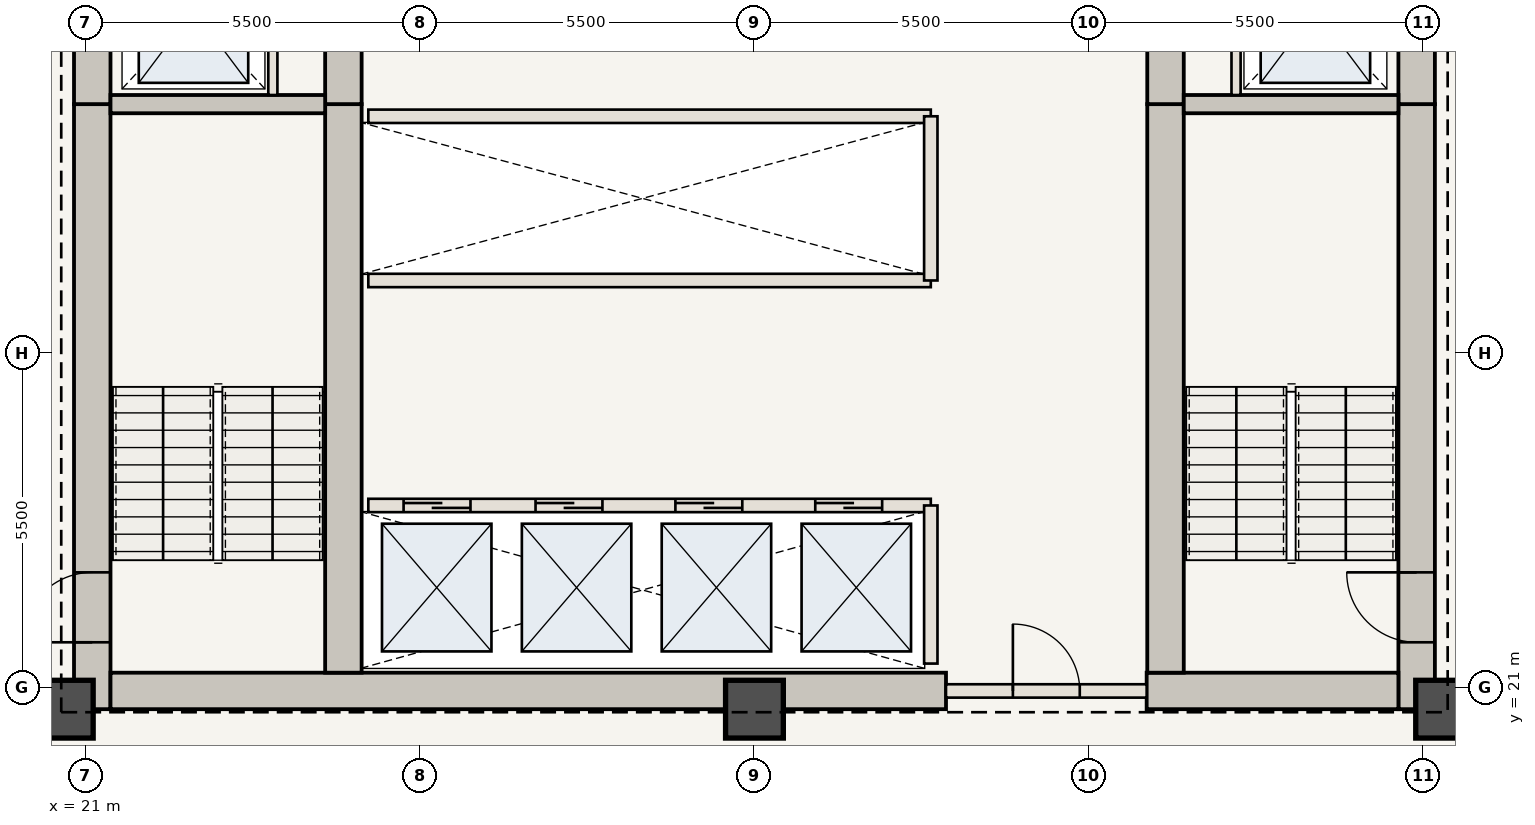
"""IFC4 building model, lengths in metres.
Left out: names, types, materials, properties, quantities, classifications, styles, units other than length and angle.
Written with IfcOpenShell. Run it as: python <this file> out.ifc"""

import sys

from ifc_helpers import new_model, si_unit, direction, frame, frame_2d, origin, origin_2d, place, context, subcontext, project, spatial, rectangle, extrude, element, fill, save


model = new_model("IFC4")
c1 = context("Model", 3, precision=1e-05, world=origin(), true_north=direction((0.0, 1.0)))
c2 = subcontext(c1, "Body", "Model", "MODEL_VIEW")
j1 = project(units=[si_unit("LENGTHUNIT", "METRE"), si_unit("PLANEANGLEUNIT", "RADIAN")], contexts=[c1])
p1 = place(None, origin())
s1 = spatial("IfcSite", under=j1, at=p1, CompositionType="ELEMENT")
p2 = place(p1, origin())
s2 = spatial("IfcBuilding", under=s1, at=p2, CompositionType="ELEMENT")
p3 = place(p2, frame((0.0, 0.0, 149.1)))
s3 = spatial("IfcBuildingStorey", under=s2, at=p3, CompositionType="ELEMENT", Elevation=149.1)
p4 = place(p3, frame((21.11, 20.65, 0.0), z_axis=(0.0, 0.0, 1.0), x_axis=(0.0, 1.0, 0.0)))
e1 = element("IfcWall", 1, at=p4, inside=s3, PredefinedType="SHEAR", context=c2, shape_type="SweptSolid", body=[
    extrude(rectangle(XDim=9.95, YDim=0.6, at=frame_2d((4.975, 0.0))), origin(), (0.0, 0.0, 1.0), 3.85),
])
p5 = place(p4, frame((1.1, 0.0, 0.0)))
e2 = element("IfcOpeningElement", 2, at=p5, cuts=e1, PredefinedType="OPENING", context=c2, shape_type="SweptSolid", body=[
    extrude(rectangle(XDim=1.15, YDim=2.15, at=frame_2d((0.575, 1.075))), frame((0.0, 0.31, 0.0), z_axis=(0.0, -1.0, 0.0), x_axis=(1.0, 0.0, 0.0)), (0.0, 0.0, 1.0), 0.62),
])
p6 = place(p3, frame((21.11, 30.6, 0.0), z_axis=(0.0, 0.0, 1.0), x_axis=(0.0, 1.0, 0.0)))
e3 = element("IfcWall", 3, at=p6, inside=s3, PredefinedType="SHEAR", context=c2, shape_type="SweptSolid", body=[
    extrude(rectangle(XDim=12.7, YDim=0.6, at=frame_2d((6.35, 0.0))), origin(), (0.0, 0.0, 1.0), 3.85),
])
p7 = place(p6, frame((4.2, 0.0, 0.0)))
e4 = element("IfcOpeningElement", 4, at=p7, cuts=e3, PredefinedType="OPENING", context=c2, shape_type="SweptSolid", body=[
    extrude(rectangle(XDim=1.1, YDim=2.15, at=frame_2d((0.55, 1.075))), frame((0.0, 0.31, 0.0), z_axis=(0.0, -1.0, 0.0), x_axis=(1.0, 0.0, 0.0)), (0.0, 0.0, 1.0), 0.62),
])
p8 = place(p6, frame((9.2, 0.0, 0.0)))
e5 = element("IfcOpeningElement", 5, at=p8, cuts=e3, PredefinedType="OPENING", context=c2, shape_type="SweptSolid", body=[
    extrude(rectangle(XDim=0.92, YDim=2.1, at=frame_2d((0.46, 1.05))), frame((0.0, 0.31, 0.0), z_axis=(0.0, -1.0, 0.0), x_axis=(1.0, 0.0, 0.0)), (0.0, 0.0, 1.0), 0.62),
])
p9 = place(p3, frame((42.89, 20.65, 0.0), z_axis=(0.0, 0.0, 1.0), x_axis=(0.0, 1.0, 0.0)))
e6 = element("IfcWall", 6, at=p9, inside=s3, PredefinedType="SHEAR", context=c2, shape_type="SweptSolid", body=[
    extrude(rectangle(XDim=9.95, YDim=0.6, at=frame_2d((4.975, 0.0))), origin(), (0.0, 0.0, 1.0), 3.85),
])
p10 = place(p9, frame((1.1, 0.0, 0.0)))
e7 = element("IfcOpeningElement", 7, at=p10, cuts=e6, PredefinedType="OPENING", context=c2, shape_type="SweptSolid", body=[
    extrude(rectangle(XDim=1.15, YDim=2.15, at=frame_2d((0.575, 1.075))), frame((0.0, 0.31, 0.0), z_axis=(0.0, -1.0, 0.0), x_axis=(1.0, 0.0, 0.0)), (0.0, 0.0, 1.0), 0.62),
])
p11 = place(p3, frame((42.89, 30.6, 0.0), z_axis=(0.0, 0.0, 1.0), x_axis=(0.0, 1.0, 0.0)))
e8 = element("IfcWall", 8, at=p11, inside=s3, PredefinedType="SHEAR", context=c2, shape_type="SweptSolid", body=[
    extrude(rectangle(XDim=12.7, YDim=0.6, at=frame_2d((6.35, 0.0))), origin(), (0.0, 0.0, 1.0), 3.85),
])
p12 = place(p11, frame((4.2, 0.0, 0.0)))
e9 = element("IfcOpeningElement", 9, at=p12, cuts=e8, PredefinedType="OPENING", context=c2, shape_type="SweptSolid", body=[
    extrude(rectangle(XDim=1.1, YDim=2.15, at=frame_2d((0.55, 1.075))), frame((0.0, 0.31, 0.0), z_axis=(0.0, -1.0, 0.0), x_axis=(1.0, 0.0, 0.0)), (0.0, 0.0, 1.0), 0.62),
])
p13 = place(p11, frame((8.05, 0.0, 0.0)))
e10 = element("IfcOpeningElement", 10, at=p13, cuts=e8, PredefinedType="OPENING", context=c2, shape_type="SweptSolid", body=[
    extrude(rectangle(XDim=0.88, YDim=2.1, at=frame_2d((0.44, 1.05))), frame((0.0, 0.31, 0.0), z_axis=(0.0, -1.0, 0.0), x_axis=(1.0, 0.0, 0.0)), (0.0, 0.0, 1.0), 0.62),
])
p14 = place(p11, frame((9.45, 0.0, 0.0)))
e11 = element("IfcOpeningElement", 11, at=p14, cuts=e8, PredefinedType="OPENING", context=c2, shape_type="SweptSolid", body=[
    extrude(rectangle(XDim=0.88, YDim=2.1, at=frame_2d((0.44, 1.05))), frame((0.0, 0.31, 0.0), z_axis=(0.0, -1.0, 0.0), x_axis=(1.0, 0.0, 0.0)), (0.0, 0.0, 1.0), 0.62),
])
p15 = place(p11, frame((10.85, 0.0, 0.0)))
e12 = element("IfcOpeningElement", 12, at=p15, cuts=e8, PredefinedType="OPENING", context=c2, shape_type="SweptSolid", body=[
    extrude(rectangle(XDim=0.88, YDim=2.1, at=frame_2d((0.44, 1.05))), frame((0.0, 0.31, 0.0), z_axis=(0.0, -1.0, 0.0), x_axis=(1.0, 0.0, 0.0)), (0.0, 0.0, 1.0), 0.62),
])
p16 = place(p3, frame((21.41, 20.95, 0.0), z_axis=(0.0, 0.0, 1.0), x_axis=(1.0, 0.0, 0.0)))
e13 = element("IfcWall", 13, at=p16, inside=s3, PredefinedType="SHEAR", context=c2, shape_type="SweptSolid", body=[
    extrude(rectangle(XDim=13.74, YDim=0.6, at=frame_2d((6.87, 0.0))), origin(), (0.0, 0.0, 1.0), 3.85),
])
p17 = place(p3, frame((38.45, 20.95, 0.0), z_axis=(0.0, 0.0, 1.0), x_axis=(1.0, 0.0, 0.0)))
e14 = element("IfcWall", 14, at=p17, inside=s3, PredefinedType="SHEAR", context=c2, shape_type="SweptSolid", body=[
    extrude(rectangle(XDim=4.14, YDim=0.6, at=frame_2d((2.07, 0.0))), origin(), (0.0, 0.0, 1.0), 3.85),
])
p18 = place(p3, frame((25.24, 21.25, 0.0), z_axis=(0.0, 0.0, 1.0), x_axis=(0.0, 1.0, 0.0)))
e15 = element("IfcWall", 15, at=p18, inside=s3, PredefinedType="SHEAR", context=c2, shape_type="SweptSolid", body=[
    extrude(rectangle(XDim=9.35, YDim=0.6, at=frame_2d((4.675, 0.0))), origin(), (0.0, 0.0, 1.0), 3.85),
])
p19 = place(p3, frame((25.24, 30.6, 0.0), z_axis=(0.0, 0.0, 1.0), x_axis=(0.0, 1.0, 0.0)))
e16 = element("IfcWall", 16, at=p19, inside=s3, PredefinedType="SHEAR", context=c2, shape_type="SweptSolid", body=[
    extrude(rectangle(XDim=12.1, YDim=0.6, at=frame_2d((6.05, 0.0))), origin(), (0.0, 0.0, 1.0), 3.85),
])
p20 = place(p19, frame((6.25, 0.0, 0.0)))
e17 = element("IfcOpeningElement", 17, at=p20, cuts=e16, PredefinedType="OPENING", context=c2, shape_type="SweptSolid", body=[
    extrude(rectangle(XDim=1.1, YDim=2.15, at=frame_2d((0.55, 1.075))), frame((0.0, 0.31, 0.0), z_axis=(0.0, -1.0, 0.0), x_axis=(1.0, 0.0, 0.0)), (0.0, 0.0, 1.0), 0.62),
])
p21 = place(p3, frame((38.76, 21.25, 0.0), z_axis=(0.0, 0.0, 1.0), x_axis=(0.0, 1.0, 0.0)))
e18 = element("IfcWall", 18, at=p21, inside=s3, PredefinedType="SHEAR", context=c2, shape_type="SweptSolid", body=[
    extrude(rectangle(XDim=9.35, YDim=0.6, at=frame_2d((4.675, 0.0))), origin(), (0.0, 0.0, 1.0), 3.85),
])
p22 = place(p3, frame((38.76, 30.6, 0.0), z_axis=(0.0, 0.0, 1.0), x_axis=(0.0, 1.0, 0.0)))
e19 = element("IfcWall", 19, at=p22, inside=s3, PredefinedType="SHEAR", context=c2, shape_type="SweptSolid", body=[
    extrude(rectangle(XDim=12.1, YDim=0.6, at=frame_2d((6.05, 0.0))), origin(), (0.0, 0.0, 1.0), 3.85),
])
for number, where, z_axis, x_axis in (
    (20, (20.65, 20.65, 0.0), (0.0, 0.0, 1.0), (1.0, 0.0, 0.0)),
    (21, (32.0, 20.65, 0.0), (0.0, 0.0, 1.0), (1.0, 0.0, 0.0)),
    (22, (43.35, 20.65, 0.0), (0.0, 0.0, 1.0), (1.0, 0.0, 0.0)),
):
    element("IfcColumn", number, at=place(p3, frame(where, z_axis=z_axis, x_axis=x_axis)), inside=s3, PredefinedType="COLUMN", context=c2, shape_type="SweptSolid", body=[
        extrude(rectangle(XDim=0.95, YDim=0.95, at=origin_2d()), origin(), (0.0, 0.0, 1.0), 3.85),
    ])
for number, where, z_axis, x_axis in (
    (23, (21.41, 30.6, 0.0), (0.0, 0.0, 1.0), (1.0, 0.0, 0.0)),
    (24, (39.06, 30.6, 0.0), (0.0, 0.0, 1.0), (1.0, 0.0, 0.0)),
):
    element("IfcWall", number, at=place(p3, frame(where, z_axis=z_axis, x_axis=x_axis)), inside=s3, PredefinedType="SHEAR", context=c2, shape_type="SweptSolid", body=[
        extrude(rectangle(XDim=3.53, YDim=0.3, at=frame_2d((1.765, 0.0))), origin(), (0.0, 0.0, 1.0), 3.685),
    ])
for number, where, z_axis, x_axis in (
    (25, (24.08, 30.75, 0.0), (0.0, 0.0, 1.0), (0.0, 1.0, 0.0)),
    (26, (39.92, 30.75, 0.0), (0.0, 0.0, 1.0), (0.0, 1.0, 0.0)),
):
    element("IfcWall", number, at=place(p3, frame(where, z_axis=z_axis, x_axis=x_axis)), inside=s3, PredefinedType="STANDARD", context=c2, shape_type="SweptSolid", body=[
        extrude(rectangle(XDim=2.65, YDim=0.15, at=frame_2d((1.325, 0.0))), origin(), (0.0, 0.0, 1.0), 3.685),
    ])
p23 = place(p3, frame((35.15, 20.95, 0.0), z_axis=(0.0, 0.0, 1.0), x_axis=(1.0, 0.0, 0.0)))
e27 = element("IfcWall", 27, at=p23, inside=s3, PredefinedType="STANDARD", context=c2, shape_type="SweptSolid", body=[
    extrude(rectangle(XDim=3.3, YDim=0.22, at=frame_2d((1.65, 0.0))), origin(), (0.0, 0.0, 1.0), 3.685),
])
p24 = place(p23, frame((1.1, 0.0, 0.0)))
e28 = element("IfcOpeningElement", 28, at=p24, cuts=e27, PredefinedType="OPENING", context=c2, shape_type="SweptSolid", body=[
    extrude(rectangle(XDim=1.1, YDim=2.15, at=frame_2d((0.55, 1.075))), frame((0.0, 0.12, 0.0), z_axis=(0.0, -1.0, 0.0), x_axis=(1.0, 0.0, 0.0)), (0.0, 0.0, 1.0), 0.24),
])
p25 = place(p3, frame((25.65, 24.0, 0.0), z_axis=(0.0, 0.0, 1.0), x_axis=(1.0, 0.0, 0.0)))
e29 = element("IfcWall", 29, at=p25, inside=s3, PredefinedType="STANDARD", context=c2, shape_type="SweptSolid", body=[
    extrude(rectangle(XDim=9.25, YDim=0.22, at=frame_2d((4.625, 0.0))), origin(), (0.0, 0.0, 1.0), 3.685),
])
p26 = place(p25, frame((0.58, 0.0, 0.0)))
e30 = element("IfcOpeningElement", 30, at=p26, cuts=e29, PredefinedType="OPENING", context=c2, shape_type="SweptSolid", body=[
    extrude(rectangle(XDim=1.1, YDim=2.15, at=frame_2d((0.55, 1.075))), frame((0.0, 0.12, 0.0), z_axis=(0.0, -1.0, 0.0), x_axis=(1.0, 0.0, 0.0)), (0.0, 0.0, 1.0), 0.24),
])
p27 = place(p25, frame((2.75, 0.0, 0.0)))
e31 = element("IfcOpeningElement", 31, at=p27, cuts=e29, PredefinedType="OPENING", context=c2, shape_type="SweptSolid", body=[
    extrude(rectangle(XDim=1.1, YDim=2.15, at=frame_2d((0.55, 1.075))), frame((0.0, 0.12, 0.0), z_axis=(0.0, -1.0, 0.0), x_axis=(1.0, 0.0, 0.0)), (0.0, 0.0, 1.0), 0.24),
])
p28 = place(p25, frame((5.05, 0.0, 0.0)))
e32 = element("IfcOpeningElement", 32, at=p28, cuts=e29, PredefinedType="OPENING", context=c2, shape_type="SweptSolid", body=[
    extrude(rectangle(XDim=1.1, YDim=2.15, at=frame_2d((0.55, 1.075))), frame((0.0, 0.12, 0.0), z_axis=(0.0, -1.0, 0.0), x_axis=(1.0, 0.0, 0.0)), (0.0, 0.0, 1.0), 0.24),
])
p29 = place(p25, frame((7.35, 0.0, 0.0)))
e33 = element("IfcOpeningElement", 33, at=p29, cuts=e29, PredefinedType="OPENING", context=c2, shape_type="SweptSolid", body=[
    extrude(rectangle(XDim=1.1, YDim=2.15, at=frame_2d((0.55, 1.075))), frame((0.0, 0.12, 0.0), z_axis=(0.0, -1.0, 0.0), x_axis=(1.0, 0.0, 0.0)), (0.0, 0.0, 1.0), 0.24),
])
p30 = place(p3, frame((34.9, 21.4, 0.0), z_axis=(0.0, 0.0, 1.0), x_axis=(0.0, 1.0, 0.0)))
e34 = element("IfcWall", 34, at=p30, inside=s3, PredefinedType="STANDARD", context=c2, shape_type="SweptSolid", body=[
    extrude(rectangle(XDim=2.6, YDim=0.22, at=frame_2d((1.3, 0.0))), origin(), (0.0, 0.0, 1.0), 3.685),
])
for number, where, z_axis, x_axis in (
    (35, (25.65, 27.7, 0.0), (0.0, 0.0, 1.0), (1.0, 0.0, 0.0)),
    (36, (25.65, 30.4, 0.0), (0.0, 0.0, 1.0), (1.0, 0.0, 0.0)),
):
    element("IfcWall", number, at=place(p3, frame(where, z_axis=z_axis, x_axis=x_axis)), inside=s3, PredefinedType="STANDARD", context=c2, shape_type="SweptSolid", body=[
        extrude(rectangle(XDim=9.25, YDim=0.22, at=frame_2d((4.625, 0.0))), origin(), (0.0, 0.0, 1.0), 3.685),
    ])
p31 = place(p3, frame((34.9, 27.7, 0.0), z_axis=(0.0, 0.0, 1.0), x_axis=(0.0, 1.0, 0.0)))
e37 = element("IfcWall", 37, at=p31, inside=s3, PredefinedType="STANDARD", context=c2, shape_type="SweptSolid", body=[
    extrude(rectangle(XDim=2.7, YDim=0.22, at=frame_2d((1.35, 0.0))), origin(), (0.0, 0.0, 1.0), 3.685),
])
p32 = place(p5, origin())
e38 = element("IfcDoor", 38, at=p32, inside=s3, OperationType="SINGLE_SWING_LEFT", PredefinedType="DOOR", context=c2, shape_type="SweptSolid", body=[
    extrude(rectangle(XDim=1.15, YDim=2.15, at=frame_2d((0.575, 1.075))), frame((0.0, 0.025, 0.0), z_axis=(0.0, -1.0, 0.0), x_axis=(1.0, 0.0, 0.0)), (0.0, 0.0, 1.0), 0.05),
])
fill(e2, e38)
p33 = place(p10, origin())
e39 = element("IfcDoor", 39, at=p33, inside=s3, OperationType="SINGLE_SWING_RIGHT", PredefinedType="DOOR", context=c2, shape_type="SweptSolid", body=[
    extrude(rectangle(XDim=1.15, YDim=2.15, at=frame_2d((0.575, 1.075))), frame((0.0, 0.025, 0.0), z_axis=(0.0, -1.0, 0.0), x_axis=(1.0, 0.0, 0.0)), (0.0, 0.0, 1.0), 0.05),
])
fill(e7, e39)
p34 = place(p24, origin())
e40 = element("IfcDoor", 40, at=p34, inside=s3, OperationType="SINGLE_SWING_LEFT", PredefinedType="DOOR", context=c2, shape_type="SweptSolid", body=[
    extrude(rectangle(XDim=1.1, YDim=2.15, at=frame_2d((0.55, 1.075))), frame((0.0, 0.025, 0.0), z_axis=(0.0, -1.0, 0.0), x_axis=(1.0, 0.0, 0.0)), (0.0, 0.0, 1.0), 0.05),
])
fill(e28, e40)
p35 = place(p26, origin())
e41 = element("IfcDoor", 41, at=p35, inside=s3, OperationType="DOUBLE_DOOR_SLIDING", PredefinedType="DOOR", context=c2, shape_type="SweptSolid", body=[
    extrude(rectangle(XDim=1.1, YDim=2.15, at=frame_2d((0.55, 1.075))), frame((0.0, 0.025, 0.0), z_axis=(0.0, -1.0, 0.0), x_axis=(1.0, 0.0, 0.0)), (0.0, 0.0, 1.0), 0.05),
])
fill(e30, e41)
p36 = place(p27, origin())
e42 = element("IfcDoor", 42, at=p36, inside=s3, OperationType="DOUBLE_DOOR_SLIDING", PredefinedType="DOOR", context=c2, shape_type="SweptSolid", body=[
    extrude(rectangle(XDim=1.1, YDim=2.15, at=frame_2d((0.55, 1.075))), frame((0.0, 0.025, 0.0), z_axis=(0.0, -1.0, 0.0), x_axis=(1.0, 0.0, 0.0)), (0.0, 0.0, 1.0), 0.05),
])
fill(e31, e42)
p37 = place(p28, origin())
e43 = element("IfcDoor", 43, at=p37, inside=s3, OperationType="DOUBLE_DOOR_SLIDING", PredefinedType="DOOR", context=c2, shape_type="SweptSolid", body=[
    extrude(rectangle(XDim=1.1, YDim=2.15, at=frame_2d((0.55, 1.075))), frame((0.0, 0.025, 0.0), z_axis=(0.0, -1.0, 0.0), x_axis=(1.0, 0.0, 0.0)), (0.0, 0.0, 1.0), 0.05),
])
fill(e32, e43)
p38 = place(p29, origin())
e44 = element("IfcDoor", 44, at=p38, inside=s3, OperationType="DOUBLE_DOOR_SLIDING", PredefinedType="DOOR", context=c2, shape_type="SweptSolid", body=[
    extrude(rectangle(XDim=1.1, YDim=2.15, at=frame_2d((0.55, 1.075))), frame((0.0, 0.025, 0.0), z_axis=(0.0, -1.0, 0.0), x_axis=(1.0, 0.0, 0.0)), (0.0, 0.0, 1.0), 0.05),
])
fill(e33, e44)
save(model, sys.argv[1])
